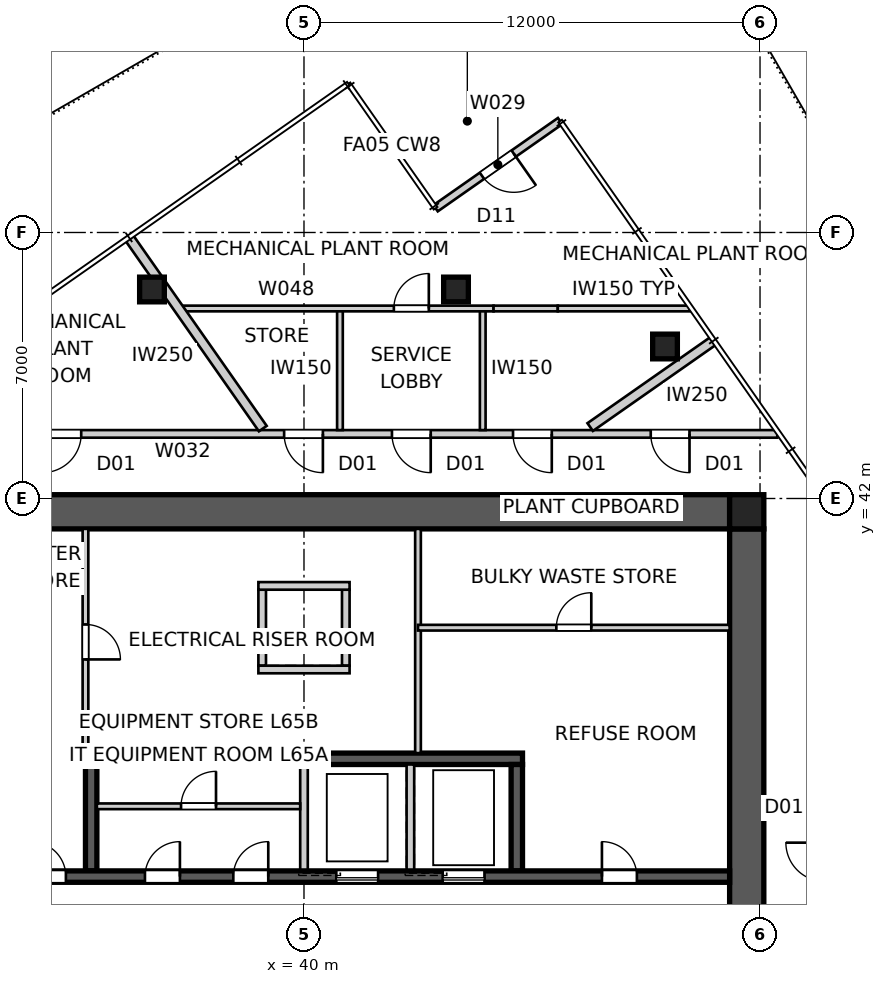
"""IFC4 building model, lengths in metres.
Left out: names, types, materials, properties, quantities, classifications, styles, units other than length and angle.
Written with IfcOpenShell. Run it as: python <this file> out.ifc"""

import sys

from ifc_helpers import new_model, si_unit, direction, frame, frame_2d, origin, origin_2d, place, context, subcontext, project, spatial, polyline, rectangle, outline, extrude, element, fill, save


model = new_model("IFC4")
c1 = context("Model", 3, precision=1e-05, world=origin(), true_north=direction((0.0, 1.0)))
c2 = subcontext(c1, "Body", "Model", "MODEL_VIEW")
j1 = project(units=[si_unit("LENGTHUNIT", "METRE"), si_unit("PLANEANGLEUNIT", "RADIAN")], contexts=[c1])
p1 = place(None, origin())
s1 = spatial("IfcSite", under=j1, at=p1, CompositionType="ELEMENT")
p2 = place(p1, origin())
s2 = spatial("IfcBuilding", under=s1, at=p2, CompositionType="ELEMENT")
p3 = place(p2, frame((0.0, 0.0, 235.4)))
s3 = spatial("IfcBuildingStorey", under=s2, at=p3, CompositionType="ELEMENT", Elevation=235.4)
p4 = place(p3, frame((28.8, 41.65, 0.0), z_axis=(0.0, 0.0, 1.0), x_axis=(1.0, 0.0, 0.0)))
e1 = element("IfcWall", 1, at=p4, inside=s3, PredefinedType="SHEAR", context=c2, shape_type="SweptSolid", body=[
    extrude(outline(polyline([(0.0, -0.45), (22.4, -0.45), (22.4, -0.025), (22.85, -0.025), (22.85, 0.025), (22.4, 0.025), (22.4, 0.45), (0.0, 0.45), (0.0, 0.025), (-0.45, 0.025), (-0.45, -0.025), (0.0, -0.025), (0.0, -0.45)])), origin(), (0.0, 0.0, 1.0), 5.0),
])
p5 = place(p3, frame((51.65, 18.8, 0.0), z_axis=(0.0, 0.0, 1.0), x_axis=(0.0, 1.0, 0.0)))
e2 = element("IfcWall", 2, at=p5, inside=s3, PredefinedType="SHEAR", context=c2, shape_type="SweptSolid", body=[
    extrude(outline(polyline([(0.0, -0.45), (22.4, -0.45), (22.4, -0.025), (22.85, -0.025), (22.85, 0.025), (22.4, 0.025), (22.4, 0.45), (0.0, 0.45), (0.0, 0.025), (-0.45, 0.025), (-0.45, -0.025), (0.0, -0.025), (0.0, -0.45)])), origin(), (0.0, 0.0, 1.0), 5.0),
])
p6 = place(p5, frame((11.14, 0.0, 0.0)))
e3 = element("IfcOpeningElement", 3, at=p6, cuts=e2, PredefinedType="OPENING", context=c2, shape_type="SweptSolid", body=[
    extrude(rectangle(XDim=1.02, YDim=2.4, at=frame_2d((0.51, 1.2))), frame((0.0, 0.46, 0.0), z_axis=(0.0, -1.0, 0.0), x_axis=(1.0, 0.0, 0.0)), (0.0, 0.0, 1.0), 0.92),
])
p7 = place(p3, frame((28.8, 32.05, 0.0), z_axis=(0.0, 0.0, 1.0), x_axis=(1.0, 0.0, 0.0)))
e4 = element("IfcWall", 4, at=p7, inside=s3, PredefinedType="SHEAR", context=c2, shape_type="SweptSolid", body=[
    extrude(rectangle(XDim=22.4, YDim=0.3, at=frame_2d((11.2, 0.0))), origin(), (0.0, 0.0, 1.0), 5.0),
])
p8 = place(p7, frame((19.04, 0.0, 0.0)))
e5 = element("IfcOpeningElement", 5, at=p8, cuts=e4, PredefinedType="OPENING", context=c2, shape_type="SweptSolid", body=[
    extrude(rectangle(XDim=0.92, YDim=2.1, at=frame_2d((0.46, 1.05))), frame((0.0, 0.16, 0.0), z_axis=(0.0, -1.0, 0.0), x_axis=(1.0, 0.0, 0.0)), (0.0, 0.0, 1.0), 0.32),
])
p9 = place(p7, frame((1.265, 0.0, 0.0)))
e6 = element("IfcOpeningElement", 6, at=p9, cuts=e4, PredefinedType="OPENING", context=c2, shape_type="SweptSolid", body=[
    extrude(rectangle(XDim=1.02, YDim=2.1, at=frame_2d((0.51, 1.05))), frame((0.0, 0.16, 0.0), z_axis=(0.0, -1.0, 0.0), x_axis=(1.0, 0.0, 0.0)), (0.0, 0.0, 1.0), 0.32),
])
p10 = place(p7, frame((4.015, 0.0, 0.0)))
e7 = element("IfcOpeningElement", 7, at=p10, cuts=e4, PredefinedType="OPENING", context=c2, shape_type="SweptSolid", body=[
    extrude(rectangle(XDim=0.92, YDim=2.1, at=frame_2d((0.46, 1.05))), frame((0.0, 0.16, 0.0), z_axis=(0.0, -1.0, 0.0), x_axis=(1.0, 0.0, 0.0)), (0.0, 0.0, 1.0), 0.32),
])
p11 = place(p7, frame((7.015, 0.0, 0.0)))
e8 = element("IfcOpeningElement", 8, at=p11, cuts=e4, PredefinedType="OPENING", context=c2, shape_type="SweptSolid", body=[
    extrude(rectangle(XDim=0.92, YDim=2.1, at=frame_2d((0.46, 1.05))), frame((0.0, 0.16, 0.0), z_axis=(0.0, -1.0, 0.0), x_axis=(1.0, 0.0, 0.0)), (0.0, 0.0, 1.0), 0.32),
])
p12 = place(p7, frame((9.34, 0.0, 0.0)))
e9 = element("IfcOpeningElement", 9, at=p12, cuts=e4, PredefinedType="OPENING", context=c2, shape_type="SweptSolid", body=[
    extrude(rectangle(XDim=0.92, YDim=2.1, at=frame_2d((0.46, 1.05))), frame((0.0, 0.16, 0.0), z_axis=(0.0, -1.0, 0.0), x_axis=(1.0, 0.0, 0.0)), (0.0, 0.0, 1.0), 0.32),
])
p13 = place(p7, frame((12.05, 0.0, 0.0)))
e10 = element("IfcOpeningElement", 10, at=p13, cuts=e4, PredefinedType="OPENING", context=c2, shape_type="SweptSolid", body=[
    extrude(rectangle(XDim=1.1, YDim=2.1, at=frame_2d((0.55, 1.05))), frame((0.0, 0.16, 0.0), z_axis=(0.0, -1.0, 0.0), x_axis=(1.0, 0.0, 0.0)), (0.0, 0.0, 1.0), 0.32),
])
p14 = place(p7, frame((14.85, 0.0, 0.0)))
e11 = element("IfcOpeningElement", 11, at=p14, cuts=e4, PredefinedType="OPENING", context=c2, shape_type="SweptSolid", body=[
    extrude(rectangle(XDim=1.1, YDim=2.1, at=frame_2d((0.55, 1.05))), frame((0.0, 0.16, 0.0), z_axis=(0.0, -1.0, 0.0), x_axis=(1.0, 0.0, 0.0)), (0.0, 0.0, 1.0), 0.32),
])
p15 = place(p3, frame((34.25, 35.15, 0.0), z_axis=(0.0, 0.0, 1.0), x_axis=(1.0, 0.0, 0.0)))
e12 = element("IfcWall", 12, at=p15, inside=s3, PredefinedType="SHEAR", context=c2, shape_type="SweptSolid", body=[
    extrude(rectangle(XDim=11.5, YDim=0.3, at=frame_2d((5.75, 0.0))), origin(), (0.0, 0.0, 1.0), 5.0),
])
p16 = place(p3, frame((34.4, 32.2, 0.0), z_axis=(0.0, 0.0, 1.0), x_axis=(0.0, 1.0, 0.0)))
e13 = element("IfcWall", 13, at=p16, inside=s3, PredefinedType="SHEAR", context=c2, shape_type="SweptSolid", body=[
    extrude(rectangle(XDim=2.8, YDim=0.3, at=frame_2d((1.4, 0.0))), origin(), (0.0, 0.0, 1.0), 5.0),
])
for number, where, z_axis, x_axis in (
    (14, (40.0, 32.2, 0.0), (0.0, 0.0, 1.0), (0.0, 1.0, 0.0)),
    (15, (42.8, 32.2, 0.0), (0.0, 0.0, 1.0), (0.0, 1.0, 0.0)),
):
    element("IfcWall", number, at=place(p3, frame(where, z_axis=z_axis, x_axis=x_axis)), inside=s3, PredefinedType="SOLIDWALL", context=c2, shape_type="SweptSolid", body=[
        extrude(rectangle(XDim=2.8, YDim=0.2, at=frame_2d((1.4, 0.0))), origin(), (0.0, 0.0, 1.0), 5.0),
    ])
p17 = place(p3, frame((45.6, 32.2, 0.0), z_axis=(0.0, 0.0, 1.0), x_axis=(0.0, 1.0, 0.0)))
e16 = element("IfcWall", 16, at=p17, inside=s3, PredefinedType="SHEAR", context=c2, shape_type="SweptSolid", body=[
    extrude(rectangle(XDim=2.8, YDim=0.3, at=frame_2d((1.4, 0.0))), origin(), (0.0, 0.0, 1.0), 5.0),
])
for number, where, z_axis, x_axis in (
    (17, (38.9, 37.6, 0.0), (0.0, 0.0, 1.0), (0.0, 1.0, 0.0)),
    (18, (41.1, 37.6, 0.0), (0.0, 0.0, 1.0), (0.0, 1.0, 0.0)),
):
    element("IfcWall", number, at=place(p3, frame(where, z_axis=z_axis, x_axis=x_axis)), inside=s3, PredefinedType="SOLIDWALL", context=c2, shape_type="SweptSolid", body=[
        extrude(rectangle(XDim=2.0, YDim=0.2, at=frame_2d((1.0, 0.0))), origin(), (0.0, 0.0, 1.0), 5.0),
    ])
for number, where, z_axis, x_axis in (
    (19, (38.8, 37.5, 0.0), (0.0, 0.0, 1.0), (1.0, 0.0, 0.0)),
    (20, (38.8, 39.7, 0.0), (0.0, 0.0, 1.0), (1.0, 0.0, 0.0)),
):
    element("IfcWall", number, at=place(p3, frame(where, z_axis=z_axis, x_axis=x_axis)), inside=s3, PredefinedType="SOLIDWALL", context=c2, shape_type="SweptSolid", body=[
        extrude(rectangle(XDim=2.4, YDim=0.2, at=frame_2d((1.2, 0.0))), origin(), (0.0, 0.0, 1.0), 5.0),
    ])
p18 = place(p3, frame((51.65, 41.65, 0.0), z_axis=(0.0, 0.0, 1.0), x_axis=(1.0, 0.0, 0.0)))
e21 = element("IfcColumn", 21, at=p18, inside=s3, PredefinedType="COLUMN", context=c2, shape_type="SweptSolid", body=[
    extrude(rectangle(XDim=0.9, YDim=0.9, at=origin_2d()), origin(), (0.0, 0.0, 1.0), 5.0),
])
for number, where, z_axis, x_axis in (
    (22, (49.5, 46.0, 0.0), (0.0, 0.0, 1.0), (1.0, 0.0, 0.0)),
    (23, (44.0, 47.5, 0.0), (0.0, 0.0, 1.0), (1.0, 0.0, 0.0)),
    (24, (36.0, 47.5, 0.0), (0.0, 0.0, 1.0), (1.0, 0.0, 0.0)),
):
    element("IfcColumn", number, at=place(p3, frame(where, z_axis=z_axis, x_axis=x_axis)), inside=s3, PredefinedType="COLUMN", context=c2, shape_type="SweptSolid", body=[
        extrude(rectangle(XDim=0.65, YDim=0.65, at=origin_2d()), origin(), (0.0, 0.0, 1.0), 5.0),
    ])
p19 = place(p3, frame((46.739, 51.932, 0.0), z_axis=(0.0, 0.0, 1.0), x_axis=(-0.819137286189, -0.573597512525, 0.0)))
e25 = element("IfcWall", 25, at=p19, inside=s3, PredefinedType="SOLIDWALL", context=c2, shape_type="SweptSolid", body=[
    extrude(rectangle(XDim=4.0, YDim=0.2, at=frame_2d((2.0, 0.0))), origin(), (0.0, 0.0, 1.0), 4.85),
])
p20 = place(p19, frame((1.49, 0.0, 0.0)))
e26 = element("IfcOpeningElement", 26, at=p20, cuts=e25, PredefinedType="OPENING", context=c2, shape_type="SweptSolid", body=[
    extrude(rectangle(XDim=1.02, YDim=2.1, at=frame_2d((0.51, 1.05))), frame((0.0, 0.11, 0.0), z_axis=(0.0, -1.0, 0.0), x_axis=(1.0, 0.0, 0.0)), (0.0, 0.0, 1.0), 0.22),
])
p21 = place(p3, frame((52.454, 43.7, 0.0), z_axis=(0.0, 0.0, 1.0), x_axis=(-1.0, 0.0, 0.0)))
e27 = element("IfcWall", 27, at=p21, inside=s3, PredefinedType="PARTITIONING", context=c2, shape_type="SweptSolid", body=[
    extrude(rectangle(XDim=24.375, YDim=0.2, at=frame_2d((12.188, 0.0))), origin(), (0.0, 0.0, 1.0), 4.85),
])
p22 = place(p21, frame((18.317, 0.0, 0.0)))
e28 = element("IfcOpeningElement", 28, at=p22, cuts=e27, PredefinedType="OPENING", context=c2, shape_type="SweptSolid", body=[
    extrude(rectangle(XDim=1.02, YDim=2.34, at=frame_2d((0.51, 1.17))), frame((0.0, 0.11, 0.0), z_axis=(0.0, -1.0, 0.0), x_axis=(1.0, 0.0, 0.0)), (0.0, 0.0, 1.0), 0.22),
])
p23 = place(p21, frame((2.31, 0.0, 0.0)))
e29 = element("IfcOpeningElement", 29, at=p23, cuts=e27, PredefinedType="OPENING", context=c2, shape_type="SweptSolid", body=[
    extrude(rectangle(XDim=1.02, YDim=2.34, at=frame_2d((0.51, 1.17))), frame((0.0, 0.11, 0.0), z_axis=(0.0, -1.0, 0.0), x_axis=(1.0, 0.0, 0.0)), (0.0, 0.0, 1.0), 0.22),
])
p24 = place(p21, frame((9.119, 0.0, 0.0)))
e30 = element("IfcOpeningElement", 30, at=p24, cuts=e27, PredefinedType="OPENING", context=c2, shape_type="SweptSolid", body=[
    extrude(rectangle(XDim=1.02, YDim=2.34, at=frame_2d((0.51, 1.17))), frame((0.0, 0.11, 0.0), z_axis=(0.0, -1.0, 0.0), x_axis=(1.0, 0.0, 0.0)), (0.0, 0.0, 1.0), 0.22),
])
p25 = place(p21, frame((5.934, 0.0, 0.0)))
e31 = element("IfcOpeningElement", 31, at=p25, cuts=e27, PredefinedType="OPENING", context=c2, shape_type="SweptSolid", body=[
    extrude(rectangle(XDim=1.02, YDim=2.34, at=frame_2d((0.51, 1.17))), frame((0.0, 0.11, 0.0), z_axis=(0.0, -1.0, 0.0), x_axis=(1.0, 0.0, 0.0)), (0.0, 0.0, 1.0), 0.22),
])
p26 = place(p21, frame((11.957, 0.0, 0.0)))
e32 = element("IfcOpeningElement", 32, at=p26, cuts=e27, PredefinedType="OPENING", context=c2, shape_type="SweptSolid", body=[
    extrude(rectangle(XDim=1.02, YDim=2.34, at=frame_2d((0.51, 1.17))), frame((0.0, 0.11, 0.0), z_axis=(0.0, -1.0, 0.0), x_axis=(1.0, 0.0, 0.0)), (0.0, 0.0, 1.0), 0.22),
])
p27 = place(p3, frame((50.783, 46.157, 0.0), z_axis=(0.0, 0.0, 1.0), x_axis=(-0.819156806092, -0.573569635732, 0.0)))
e33 = element("IfcWall", 33, at=p27, inside=s3, PredefinedType="PARTITIONING", context=c2, shape_type="SweptSolid", body=[
    extrude(rectangle(XDim=3.97, YDim=0.25, at=frame_2d((1.985, 0.0))), origin(), (0.0, 0.0, 1.0), 4.85),
])
p28 = place(p3, frame((35.393, 48.87, 0.0), z_axis=(0.0, 0.0, 1.0), x_axis=(0.573561042841, -0.819162822725, 0.0)))
e34 = element("IfcWall", 34, at=p28, inside=s3, PredefinedType="PARTITIONING", context=c2, shape_type="SweptSolid", body=[
    extrude(rectangle(XDim=6.142, YDim=0.25, at=frame_2d((3.071, 0.0))), origin(), (0.0, 0.0, 1.0), 4.85),
])
p29 = place(p3, frame((34.25, 41.2, 0.0), z_axis=(0.0, 0.0, 1.0), x_axis=(0.0, -1.0, 0.0)))
e35 = element("IfcWall", 35, at=p29, inside=s3, PredefinedType="SOLIDWALL", context=c2, shape_type="SweptSolid", body=[
    extrude(rectangle(XDim=5.95, YDim=0.15, at=frame_2d((2.975, 0.0))), origin(), (0.0, 0.0, 1.0), 4.85),
])
p30 = place(p29, frame((2.515, 0.0, 0.0)))
e36 = element("IfcOpeningElement", 36, at=p30, cuts=e35, PredefinedType="OPENING", context=c2, shape_type="SweptSolid", body=[
    extrude(rectangle(XDim=0.92, YDim=2.1, at=frame_2d((0.46, 1.05))), frame((0.0, 0.085, 0.0), z_axis=(0.0, -1.0, 0.0), x_axis=(1.0, 0.0, 0.0)), (0.0, 0.0, 1.0), 0.17),
])
p31 = place(p3, frame((43.0, 41.2, 0.0), z_axis=(0.0, 0.0, 1.0), x_axis=(0.0, -1.0, 0.0)))
e37 = element("IfcWall", 37, at=p31, inside=s3, PredefinedType="SOLIDWALL", context=c2, shape_type="SweptSolid", body=[
    extrude(rectangle(XDim=5.9, YDim=0.15, at=frame_2d((2.95, 0.0))), origin(), (0.0, 0.0, 1.0), 4.85),
])
p32 = place(p3, frame((43.0, 38.6, 0.0), z_axis=(0.0, 0.0, 1.0), x_axis=(1.0, 0.0, 0.0)))
e38 = element("IfcWall", 38, at=p32, inside=s3, PredefinedType="SOLIDWALL", context=c2, shape_type="SweptSolid", body=[
    extrude(rectangle(XDim=8.2, YDim=0.15, at=frame_2d((4.1, 0.0))), origin(), (0.0, 0.0, 1.0), 4.85),
])
p33 = place(p32, frame((3.64, 0.0, 0.0)))
e39 = element("IfcOpeningElement", 39, at=p33, cuts=e38, PredefinedType="OPENING", context=c2, shape_type="SweptSolid", body=[
    extrude(rectangle(XDim=0.92, YDim=2.1, at=frame_2d((0.46, 1.05))), frame((0.0, 0.085, 0.0), z_axis=(0.0, -1.0, 0.0), x_axis=(1.0, 0.0, 0.0)), (0.0, 0.0, 1.0), 0.17),
])
for number, where, z_axis, x_axis in (
    (40, (44.704, 47.0, 0.0), (0.0, 0.0, 1.0), (0.0, -1.0, 0.0)),
    (41, (40.946, 43.8, 0.0), (0.0, 0.0, 1.0), (0.0, 1.0, 0.0)),
):
    element("IfcWall", number, at=place(p3, frame(where, z_axis=z_axis, x_axis=x_axis)), inside=s3, PredefinedType="SOLIDWALL", context=c2, shape_type="SweptSolid", body=[
        extrude(rectangle(XDim=3.2, YDim=0.15, at=frame_2d((1.6, 0.0))), origin(), (0.0, 0.0, 1.0), 4.85),
    ])
p34 = place(p3, frame((36.703, 47.0, 0.0), z_axis=(0.0, 0.0, 1.0), x_axis=(1.0, 0.0, 0.0)))
e42 = element("IfcWall", 42, at=p34, inside=s3, PredefinedType="SOLIDWALL", context=c2, shape_type="SweptSolid", body=[
    extrude(rectangle(XDim=8.285, YDim=0.15, at=frame_2d((4.143, 0.0))), origin(), (0.0, 0.0, 1.0), 4.85),
])
p35 = place(p34, frame((5.662, 0.0, 0.0)))
e43 = element("IfcOpeningElement", 43, at=p35, cuts=e42, PredefinedType="OPENING", context=c2, shape_type="SweptSolid", body=[
    extrude(rectangle(XDim=0.92, YDim=2.1, at=frame_2d((0.46, 1.05))), frame((0.0, 0.085, 0.0), z_axis=(0.0, -1.0, 0.0), x_axis=(1.0, 0.0, 0.0)), (0.0, 0.0, 1.0), 0.17),
])
p36 = place(p3, frame((44.988, 47.0, 0.0), z_axis=(0.0, 0.0, 1.0), x_axis=(1.0, 0.0, 0.0)))
e44 = element("IfcWall", 44, at=p36, inside=s3, PredefinedType="SOLIDWALL", context=c2, shape_type="SweptSolid", body=[
    extrude(rectangle(XDim=1.69, YDim=0.15, at=frame_2d((0.845, 0.0))), origin(), (0.0, 0.0, 1.0), 3.85),
])
p37 = place(p3, frame((46.678, 47.0, 0.0), z_axis=(0.0, 0.0, 1.0), x_axis=(1.0, 0.0, 0.0)))
e45 = element("IfcWall", 45, at=p37, inside=s3, PredefinedType="SOLIDWALL", context=c2, shape_type="SweptSolid", body=[
    extrude(rectangle(XDim=3.465, YDim=0.15, at=frame_2d((1.732, 0.0))), origin(), (0.0, 0.0, 1.0), 4.85),
])
p38 = place(p3, frame((34.55, 33.9, 0.0), z_axis=(0.0, 0.0, 1.0), x_axis=(1.0, 0.0, 0.0)))
e46 = element("IfcWall", 46, at=p38, inside=s3, PredefinedType="SOLIDWALL", context=c2, shape_type="SweptSolid", body=[
    extrude(rectangle(XDim=5.35, YDim=0.15, at=frame_2d((2.675, 0.0))), origin(), (0.0, 0.0, 1.0), 4.85),
])
p39 = place(p38, frame((2.215, 0.0, 0.0)))
e47 = element("IfcOpeningElement", 47, at=p39, cuts=e46, PredefinedType="OPENING", context=c2, shape_type="SweptSolid", body=[
    extrude(rectangle(XDim=0.92, YDim=2.1, at=frame_2d((0.46, 1.05))), frame((0.0, 0.085, 0.0), z_axis=(0.0, -1.0, 0.0), x_axis=(1.0, 0.0, 0.0)), (0.0, 0.0, 1.0), 0.17),
])
p40 = place(p20, origin())
e48 = element("IfcDoor", 48, at=p40, inside=s3, OperationType="SINGLE_SWING_LEFT", PredefinedType="DOOR", context=c2, shape_type="SweptSolid", body=[
    extrude(rectangle(XDim=1.02, YDim=2.1, at=frame_2d((0.51, 1.05))), frame((0.0, 0.025, 0.0), z_axis=(0.0, -1.0, 0.0), x_axis=(1.0, 0.0, 0.0)), (0.0, 0.0, 1.0), 0.05),
])
fill(e26, e48)
p41 = place(p8, origin())
e49 = element("IfcDoor", 49, at=p41, inside=s3, OperationType="SINGLE_SWING_LEFT", PredefinedType="DOOR", context=c2, shape_type="SweptSolid", body=[
    extrude(rectangle(XDim=0.92, YDim=2.1, at=frame_2d((0.46, 1.05))), frame((0.0, 0.025, 0.0), z_axis=(0.0, -1.0, 0.0), x_axis=(1.0, 0.0, 0.0)), (0.0, 0.0, 1.0), 0.05),
])
fill(e5, e49)
p42 = place(p10, origin())
e50 = element("IfcDoor", 50, at=p42, inside=s3, OperationType="SINGLE_SWING_LEFT", PredefinedType="DOOR", context=c2, shape_type="SweptSolid", body=[
    extrude(rectangle(XDim=0.92, YDim=2.1, at=frame_2d((0.46, 1.05))), frame((0.0, 0.025, 0.0), z_axis=(0.0, -1.0, 0.0), x_axis=(1.0, 0.0, 0.0)), (0.0, 0.0, 1.0), 0.05),
])
fill(e7, e50)
p43 = place(p22, origin())
e51 = element("IfcDoor", 51, at=p43, inside=s3, OperationType="SINGLE_SWING_RIGHT", PredefinedType="DOOR", context=c2, shape_type="SweptSolid", body=[
    extrude(rectangle(XDim=1.02, YDim=2.34, at=frame_2d((0.51, 1.17))), frame((0.0, 0.025, 0.0), z_axis=(0.0, -1.0, 0.0), x_axis=(1.0, 0.0, 0.0)), (0.0, 0.0, 1.0), 0.05),
])
fill(e28, e51)
p44 = place(p23, origin())
e52 = element("IfcDoor", 52, at=p44, inside=s3, OperationType="SINGLE_SWING_LEFT", PredefinedType="DOOR", context=c2, shape_type="SweptSolid", body=[
    extrude(rectangle(XDim=1.02, YDim=2.34, at=frame_2d((0.51, 1.17))), frame((0.0, 0.025, 0.0), z_axis=(0.0, -1.0, 0.0), x_axis=(1.0, 0.0, 0.0)), (0.0, 0.0, 1.0), 0.05),
])
fill(e29, e52)
p45 = place(p24, origin())
e53 = element("IfcDoor", 53, at=p45, inside=s3, OperationType="SINGLE_SWING_LEFT", PredefinedType="DOOR", context=c2, shape_type="SweptSolid", body=[
    extrude(rectangle(XDim=1.02, YDim=2.34, at=frame_2d((0.51, 1.17))), frame((0.0, 0.025, 0.0), z_axis=(0.0, -1.0, 0.0), x_axis=(1.0, 0.0, 0.0)), (0.0, 0.0, 1.0), 0.05),
])
fill(e30, e53)
p46 = place(p25, origin())
e54 = element("IfcDoor", 54, at=p46, inside=s3, OperationType="SINGLE_SWING_LEFT", PredefinedType="DOOR", context=c2, shape_type="SweptSolid", body=[
    extrude(rectangle(XDim=1.02, YDim=2.34, at=frame_2d((0.51, 1.17))), frame((0.0, 0.025, 0.0), z_axis=(0.0, -1.0, 0.0), x_axis=(1.0, 0.0, 0.0)), (0.0, 0.0, 1.0), 0.05),
])
fill(e31, e54)
p47 = place(p26, origin())
e55 = element("IfcDoor", 55, at=p47, inside=s3, OperationType="SINGLE_SWING_LEFT", PredefinedType="DOOR", context=c2, shape_type="SweptSolid", body=[
    extrude(rectangle(XDim=1.02, YDim=2.34, at=frame_2d((0.51, 1.17))), frame((0.0, 0.025, 0.0), z_axis=(0.0, -1.0, 0.0), x_axis=(1.0, 0.0, 0.0)), (0.0, 0.0, 1.0), 0.05),
])
fill(e32, e55)
p48 = place(p33, origin())
e56 = element("IfcDoor", 56, at=p48, inside=s3, OperationType="SINGLE_SWING_RIGHT", PredefinedType="DOOR", context=c2, shape_type="SweptSolid", body=[
    extrude(rectangle(XDim=0.92, YDim=2.1, at=frame_2d((0.46, 1.05))), frame((0.0, 0.025, 0.0), z_axis=(0.0, -1.0, 0.0), x_axis=(1.0, 0.0, 0.0)), (0.0, 0.0, 1.0), 0.05),
])
fill(e39, e56)
p49 = place(p30, origin())
e57 = element("IfcDoor", 57, at=p49, inside=s3, OperationType="SINGLE_SWING_RIGHT", PredefinedType="DOOR", context=c2, shape_type="SweptSolid", body=[
    extrude(rectangle(XDim=0.92, YDim=2.1, at=frame_2d((0.46, 1.05))), frame((0.0, 0.025, 0.0), z_axis=(0.0, -1.0, 0.0), x_axis=(1.0, 0.0, 0.0)), (0.0, 0.0, 1.0), 0.05),
])
fill(e36, e57)
p50 = place(p35, origin())
e58 = element("IfcDoor", 58, at=p50, inside=s3, OperationType="SINGLE_SWING_RIGHT", PredefinedType="DOOR", context=c2, shape_type="SweptSolid", body=[
    extrude(rectangle(XDim=0.92, YDim=2.1, at=frame_2d((0.46, 1.05))), frame((0.0, 0.025, 0.0), z_axis=(0.0, -1.0, 0.0), x_axis=(1.0, 0.0, 0.0)), (0.0, 0.0, 1.0), 0.05),
])
fill(e43, e58)
p51 = place(p11, origin())
e59 = element("IfcDoor", 59, at=p51, inside=s3, OperationType="SINGLE_SWING_RIGHT", PredefinedType="DOOR", context=c2, shape_type="SweptSolid", body=[
    extrude(rectangle(XDim=0.92, YDim=2.1, at=frame_2d((0.46, 1.05))), frame((0.0, 0.025, 0.0), z_axis=(0.0, -1.0, 0.0), x_axis=(1.0, 0.0, 0.0)), (0.0, 0.0, 1.0), 0.05),
])
fill(e8, e59)
p52 = place(p12, origin())
e60 = element("IfcDoor", 60, at=p52, inside=s3, OperationType="SINGLE_SWING_RIGHT", PredefinedType="DOOR", context=c2, shape_type="SweptSolid", body=[
    extrude(rectangle(XDim=0.92, YDim=2.1, at=frame_2d((0.46, 1.05))), frame((0.0, 0.025, 0.0), z_axis=(0.0, -1.0, 0.0), x_axis=(1.0, 0.0, 0.0)), (0.0, 0.0, 1.0), 0.05),
])
fill(e9, e60)
p53 = place(p39, origin())
e61 = element("IfcDoor", 61, at=p53, inside=s3, OperationType="SINGLE_SWING_RIGHT", PredefinedType="DOOR", context=c2, shape_type="SweptSolid", body=[
    extrude(rectangle(XDim=0.92, YDim=2.1, at=frame_2d((0.46, 1.05))), frame((0.0, 0.025, 0.0), z_axis=(0.0, -1.0, 0.0), x_axis=(1.0, 0.0, 0.0)), (0.0, 0.0, 1.0), 0.05),
])
fill(e47, e61)
p54 = place(p13, origin())
e62 = element("IfcDoor", 62, at=p54, inside=s3, OperationType="SLIDING_TO_LEFT", PredefinedType="DOOR", context=c2, shape_type="SweptSolid", body=[
    extrude(rectangle(XDim=1.1, YDim=2.1, at=frame_2d((0.55, 1.05))), frame((0.0, 0.025, 0.0), z_axis=(0.0, -1.0, 0.0), x_axis=(1.0, 0.0, 0.0)), (0.0, 0.0, 1.0), 0.05),
])
fill(e10, e62)
p55 = place(p14, origin())
e63 = element("IfcDoor", 63, at=p55, inside=s3, OperationType="SLIDING_TO_LEFT", PredefinedType="DOOR", context=c2, shape_type="SweptSolid", body=[
    extrude(rectangle(XDim=1.1, YDim=2.1, at=frame_2d((0.55, 1.05))), frame((0.0, 0.025, 0.0), z_axis=(0.0, -1.0, 0.0), x_axis=(1.0, 0.0, 0.0)), (0.0, 0.0, 1.0), 0.05),
])
fill(e11, e63)
save(model, sys.argv[1])
